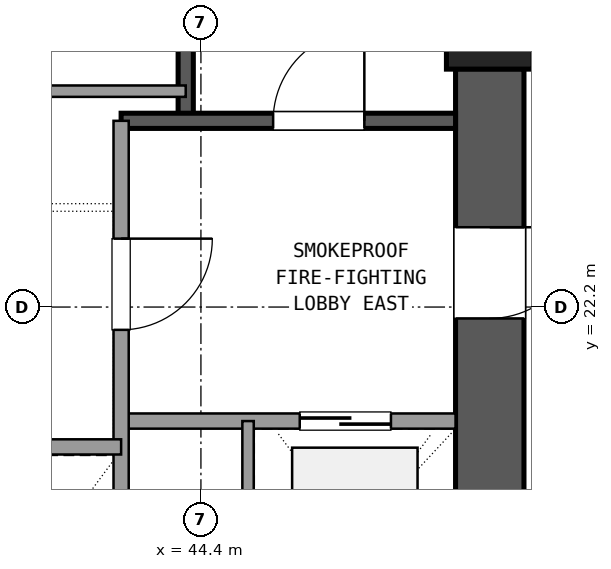
"""IFC4 building model, lengths in metres.
Left out: names, types, materials, properties, quantities, classifications, styles, units other than length and angle.
Written with IfcOpenShell. Run it as: python <this file> out.ifc"""

import sys

from ifc_helpers import new_model, si_unit, direction, frame, frame_2d, origin, origin_2d, place, context, subcontext, project, spatial, rectangle, extrude, element, fill, save


model = new_model("IFC4")
c1 = context("Model", 3, precision=1e-05, world=origin(), true_north=direction((0.0, 1.0)))
c2 = subcontext(c1, "Body", "Model", "MODEL_VIEW")
j1 = project(units=[si_unit("LENGTHUNIT", "METRE"), si_unit("PLANEANGLEUNIT", "RADIAN")], contexts=[c1])
p1 = place(None, origin())
s1 = spatial("IfcSite", under=j1, at=p1, CompositionType="ELEMENT")
p2 = place(p1, origin())
s2 = spatial("IfcBuilding", under=s1, at=p2, CompositionType="ELEMENT")
p3 = place(p2, frame((0.0, 0.0, 41.94)))
s3 = spatial("IfcBuildingStorey", under=s2, at=p3, CompositionType="ELEMENT", Elevation=41.94)
p4 = place(p3, frame((48.2, 25.9, 0.0), z_axis=(0.0, 0.0, 1.0), x_axis=(1.0, 0.0, 0.0)))
e1 = element("IfcColumn", 1, at=p4, inside=s3, PredefinedType="COLUMN", context=c2, shape_type="SweptSolid", body=[
    extrude(rectangle(XDim=1.14, YDim=1.14, at=origin_2d()), origin(), (0.0, 0.0, 1.0), 3.6),
])
p5 = place(p3, frame((48.2, 17.865, 0.0), z_axis=(0.0, 0.0, 1.0), x_axis=(0.0, 1.0, 0.0)))
e2 = element("IfcWall", 2, at=p5, inside=s3, PredefinedType="SHEAR", context=c2, shape_type="SweptSolid", body=[
    extrude(rectangle(XDim=7.47, YDim=0.9, at=frame_2d((3.735, 0.0))), origin(), (0.0, 0.0, 1.0), 3.32),
])
p6 = place(p5, frame((4.185, 0.0, 0.0)))
e3 = element("IfcOpeningElement", 3, at=p6, cuts=e2, PredefinedType="OPENING", context=c2, shape_type="SweptSolid", body=[
    extrude(rectangle(XDim=1.2, YDim=2.15, at=frame_2d((0.6, 1.075))), frame((0.0, 0.46, 0.0), z_axis=(0.0, -1.0, 0.0), x_axis=(1.0, 0.0, 0.0)), (0.0, 0.0, 1.0), 0.92),
])
p7 = place(p3, frame((44.2, 24.65, 0.0), z_axis=(0.0, 0.0, 1.0), x_axis=(0.0, 1.0, 0.0)))
e4 = element("IfcWall", 4, at=p7, inside=s3, PredefinedType="SHEAR", context=c2, shape_type="SweptSolid", body=[
    extrude(rectangle(XDim=9.4, YDim=0.2, at=frame_2d((4.7, 0.0))), origin(), (0.0, 0.0, 1.0), 3.32),
])
p8 = place(p3, frame((43.35, 24.65, 0.0), z_axis=(0.0, 0.0, 1.0), x_axis=(1.0, 0.0, 0.0)))
e5 = element("IfcWall", 5, at=p8, inside=s3, PredefinedType="SHEAR", context=c2, shape_type="SweptSolid", body=[
    extrude(rectangle(XDim=4.4, YDim=0.2, at=frame_2d((2.2, 0.0))), origin(), (0.0, 0.0, 1.0), 3.32),
])
p9 = place(p8, frame((2.0, 0.0, 0.0)))
e6 = element("IfcOpeningElement", 6, at=p9, cuts=e5, PredefinedType="OPENING", context=c2, shape_type="SweptSolid", body=[
    extrude(rectangle(XDim=1.2, YDim=2.15, at=frame_2d((0.6, 1.075))), frame((0.0, 0.11, 0.0), z_axis=(0.0, -1.0, 0.0), x_axis=(1.0, 0.0, 0.0)), (0.0, 0.0, 1.0), 0.22),
])
p10 = place(p3, frame((43.35, 20.7, 0.0), z_axis=(0.0, 0.0, 1.0), x_axis=(1.0, 0.0, 0.0)))
e7 = element("IfcWall", 7, at=p10, inside=s3, PredefinedType="SOLIDWALL", context=c2, shape_type="SweptSolid", body=[
    extrude(rectangle(XDim=4.4, YDim=0.2, at=frame_2d((2.2, 0.0))), origin(), (0.0, 0.0, 1.0), 2.61),
])
p11 = place(p10, frame((2.35, 0.0, 0.0)))
e8 = element("IfcOpeningElement", 8, at=p11, cuts=e7, PredefinedType="OPENING", context=c2, shape_type="SweptSolid", body=[
    extrude(rectangle(XDim=1.2, YDim=2.15, at=frame_2d((0.6, 1.075))), frame((0.0, 0.11, 0.0), z_axis=(0.0, -1.0, 0.0), x_axis=(1.0, 0.0, 0.0)), (0.0, 0.0, 1.0), 0.22),
])
p12 = place(p3, frame((43.35, 17.75, 0.0), z_axis=(0.0, 0.0, 1.0), x_axis=(0.0, 1.0, 0.0)))
e9 = element("IfcWall", 9, at=p12, inside=s3, PredefinedType="SOLIDWALL", context=c2, shape_type="SweptSolid", body=[
    extrude(rectangle(XDim=6.9, YDim=0.2, at=frame_2d((3.45, 0.0))), origin(), (0.0, 0.0, 1.0), 2.61),
])
p13 = place(p12, frame((4.15, 0.0, 0.0)))
e10 = element("IfcOpeningElement", 10, at=p13, cuts=e9, PredefinedType="OPENING", context=c2, shape_type="SweptSolid", body=[
    extrude(rectangle(XDim=1.2, YDim=2.15, at=frame_2d((0.6, 1.075))), frame((0.0, 0.11, 0.0), z_axis=(0.0, -1.0, 0.0), x_axis=(1.0, 0.0, 0.0)), (0.0, 0.0, 1.0), 0.22),
])
p14 = place(p3, frame((45.02, 17.75, 0.0), z_axis=(0.0, 0.0, 1.0), x_axis=(0.0, 1.0, 0.0)))
e11 = element("IfcWall", 11, at=p14, inside=s3, PredefinedType="PARTITIONING", context=c2, shape_type="SweptSolid", body=[
    extrude(rectangle(XDim=2.95, YDim=0.15, at=frame_2d((1.475, 0.0))), origin(), (0.0, 0.0, 1.0), 2.61),
])
p15 = place(p3, frame((37.25, 20.36, 0.0), z_axis=(0.0, 0.0, 1.0), x_axis=(1.0, 0.0, 0.0)))
e12 = element("IfcWall", 12, at=p15, inside=s3, PredefinedType="SOLIDWALL", context=c2, shape_type="SweptSolid", body=[
    extrude(rectangle(XDim=6.1, YDim=0.2, at=frame_2d((3.05, 0.0))), origin(), (0.0, 0.0, 1.0), 2.61),
])
p16 = place(p3, frame((42.27, 25.04, 0.0), z_axis=(0.0, 0.0, 1.0), x_axis=(1.0, 0.0, 0.0)))
e13 = element("IfcWall", 13, at=p16, inside=s3, PredefinedType="PARTITIONING", context=c2, shape_type="SweptSolid", body=[
    extrude(rectangle(XDim=1.93, YDim=0.15, at=frame_2d((0.965, 0.0))), origin(), (0.0, 0.0, 1.0), 2.61),
])
p17 = place(p9, origin())
e14 = element("IfcDoor", 14, at=p17, inside=s3, OperationType="SINGLE_SWING_RIGHT", PredefinedType="DOOR", context=c2, shape_type="SweptSolid", body=[
    extrude(rectangle(XDim=1.2, YDim=2.15, at=frame_2d((0.6, 1.075))), frame((0.0, 0.025, 0.0), z_axis=(0.0, -1.0, 0.0), x_axis=(1.0, 0.0, 0.0)), (0.0, 0.0, 1.0), 0.05),
])
fill(e6, e14)
p18 = place(p11, origin())
e15 = element("IfcDoor", 15, at=p18, inside=s3, OperationType="SLIDING_TO_RIGHT", PredefinedType="DOOR", context=c2, shape_type="SweptSolid", body=[
    extrude(rectangle(XDim=1.2, YDim=2.15, at=frame_2d((0.6, 1.075))), frame((0.0, 0.025, 0.0), z_axis=(0.0, -1.0, 0.0), x_axis=(1.0, 0.0, 0.0)), (0.0, 0.0, 1.0), 0.05),
])
fill(e8, e15)
p19 = place(p13, frame((1.2, 0.0, 0.0), z_axis=(0.0, 0.0, 1.0), x_axis=(-1.0, 0.0, 0.0)))
e16 = element("IfcDoor", 16, at=p19, inside=s3, OperationType="SINGLE_SWING_RIGHT", PredefinedType="DOOR", context=c2, shape_type="SweptSolid", body=[
    extrude(rectangle(XDim=1.2, YDim=2.15, at=frame_2d((0.6, 1.075))), frame((0.0, 0.025, 0.0), z_axis=(0.0, -1.0, 0.0), x_axis=(1.0, 0.0, 0.0)), (0.0, 0.0, 1.0), 0.05),
])
fill(e10, e16)
p20 = place(p6, frame((1.2, 0.0, 0.0), z_axis=(0.0, 0.0, 1.0), x_axis=(-1.0, 0.0, 0.0)))
e17 = element("IfcDoor", 17, at=p20, inside=s3, OperationType="SINGLE_SWING_RIGHT", PredefinedType="DOOR", context=c2, shape_type="SweptSolid", body=[
    extrude(rectangle(XDim=1.2, YDim=2.15, at=frame_2d((0.6, 1.075))), frame((0.0, 0.025, 0.0), z_axis=(0.0, -1.0, 0.0), x_axis=(1.0, 0.0, 0.0)), (0.0, 0.0, 1.0), 0.05),
])
fill(e3, e17)
save(model, sys.argv[1])
